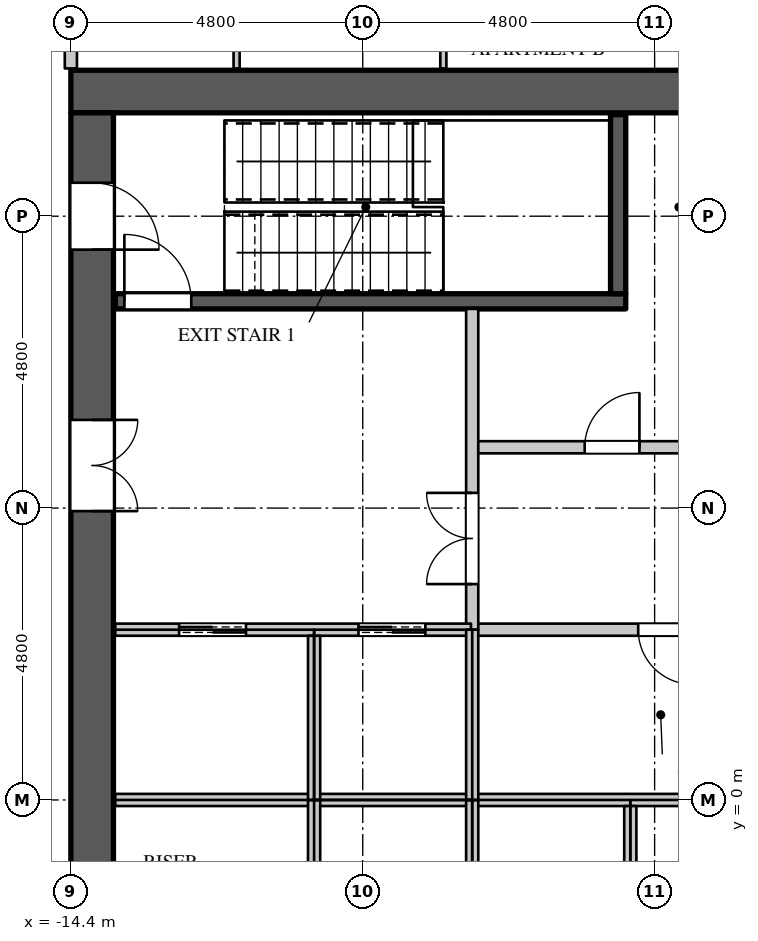
"""IFC4 building model, lengths in metres.
Left out: names, types, materials, properties, quantities, classifications, styles, units other than length and angle.
Written with IfcOpenShell. Run it as: python <this file> out.ifc"""

import sys

from ifc_helpers import new_model, si_unit, direction, frame, frame_2d, origin, place, context, subcontext, project, spatial, rectangle, extrude, element, fill, save


model = new_model("IFC4")
c1 = context("Model", 3, precision=1e-05, world=origin(), true_north=direction((0.0, 1.0)))
c2 = subcontext(c1, "Body", "Model", "MODEL_VIEW")
j1 = project(units=[si_unit("LENGTHUNIT", "METRE"), si_unit("PLANEANGLEUNIT", "RADIAN")], contexts=[c1])
p1 = place(None, origin())
s1 = spatial("IfcSite", under=j1, at=p1, CompositionType="ELEMENT")
p2 = place(p1, origin())
s2 = spatial("IfcBuilding", under=s1, at=p2, CompositionType="ELEMENT")
p3 = place(p2, frame((0.0, 0.0, 162.3)))
s3 = spatial("IfcBuildingStorey", under=s2, at=p3, CompositionType="ELEMENT", Elevation=162.3)
p4 = place(p3, frame((-14.4, 11.65, 0.0), z_axis=(0.0, 0.0, 1.0), x_axis=(1.0, 0.0, 0.0)))
e1 = element("IfcWall", 1, at=p4, inside=s3, PredefinedType="SHEAR", context=c2, shape_type="SweptSolid", body=[
    extrude(rectangle(XDim=28.8, YDim=0.7, at=frame_2d((14.4, 0.0))), origin(), (0.0, 0.0, 1.0), 4.2),
])
p5 = place(p3, frame((-14.05, -11.3, 0.0), z_axis=(0.0, 0.0, 1.0), x_axis=(0.0, 1.0, 0.0)))
e2 = element("IfcWall", 2, at=p5, inside=s3, PredefinedType="SHEAR", context=c2, shape_type="SweptSolid", body=[
    extrude(rectangle(XDim=22.6, YDim=0.7, at=frame_2d((11.3, 0.0))), origin(), (0.0, 0.0, 1.0), 4.2),
])
p6 = place(p5, frame((20.35, 0.0, 0.0)))
e3 = element("IfcOpeningElement", 3, at=p6, cuts=e2, PredefinedType="OPENING", context=c2, shape_type="SweptSolid", body=[
    extrude(rectangle(XDim=1.1, YDim=2.2, at=frame_2d((0.55, 1.1))), frame((0.0, 0.36, 0.0), z_axis=(0.0, -1.0, 0.0), x_axis=(1.0, 0.0, 0.0)), (0.0, 0.0, 1.0), 0.72),
])
p7 = place(p5, frame((1.15, 0.0, 0.0)))
e4 = element("IfcOpeningElement", 4, at=p7, cuts=e2, PredefinedType="OPENING", context=c2, shape_type="SweptSolid", body=[
    extrude(rectangle(XDim=1.1, YDim=2.2, at=frame_2d((0.55, 1.1))), frame((0.0, 0.36, 0.0), z_axis=(0.0, -1.0, 0.0), x_axis=(1.0, 0.0, 0.0)), (0.0, 0.0, 1.0), 0.72),
])
p8 = place(p5, frame((16.05, 0.0, 0.0)))
e5 = element("IfcOpeningElement", 5, at=p8, cuts=e2, PredefinedType="OPENING", context=c2, shape_type="SweptSolid", body=[
    extrude(rectangle(XDim=1.5, YDim=2.4, at=frame_2d((0.75, 1.2))), frame((0.0, 0.36, 0.0), z_axis=(0.0, -1.0, 0.0), x_axis=(1.0, 0.0, 0.0)), (0.0, 0.0, 1.0), 0.72),
])
p9 = place(p5, frame((5.05, 0.0, 0.0)))
e6 = element("IfcOpeningElement", 6, at=p9, cuts=e2, PredefinedType="OPENING", context=c2, shape_type="SweptSolid", body=[
    extrude(rectangle(XDim=1.5, YDim=2.4, at=frame_2d((0.75, 1.2))), frame((0.0, 0.36, 0.0), z_axis=(0.0, -1.0, 0.0), x_axis=(1.0, 0.0, 0.0)), (0.0, 0.0, 1.0), 0.72),
])
p10 = place(p3, frame((-14.4, 12.03, 0.0), z_axis=(0.0, 0.0, 1.0), x_axis=(0.0, 1.0, 0.0)))
e7 = element("IfcWall", 7, at=p10, inside=s3, PredefinedType="PARTITIONING", context=c2, shape_type="SweptSolid", body=[
    extrude(rectangle(XDim=2.27, YDim=0.2, at=frame_2d((1.135, 0.0))), origin(), (0.0, 0.0, 1.0), 3.95),
])
p11 = place(p3, frame((-7.82, 2.8, 0.0), z_axis=(0.0, 0.0, 1.0), x_axis=(1.0, 0.0, 0.0)))
e8 = element("IfcWall", 8, at=p11, inside=s3, PredefinedType="PARTITIONING", context=c2, shape_type="SweptSolid", body=[
    extrude(rectangle(XDim=18.24, YDim=0.2, at=frame_2d((9.12, 0.0))), origin(), (0.0, 0.0, 1.0), 3.95),
])
p12 = place(p11, frame((2.75, 0.0, 0.0)))
e9 = element("IfcOpeningElement", 9, at=p12, cuts=e8, PredefinedType="OPENING", context=c2, shape_type="SweptSolid", body=[
    extrude(rectangle(XDim=0.9, YDim=2.2, at=frame_2d((0.45, 1.1))), frame((0.0, 0.11, 0.0), z_axis=(0.0, -1.0, 0.0), x_axis=(1.0, 0.0, 0.0)), (0.0, 0.0, 1.0), 0.22),
])
p13 = place(p11, frame((9.55, 0.0, 0.0)))
e10 = element("IfcOpeningElement", 10, at=p13, cuts=e8, PredefinedType="OPENING", context=c2, shape_type="SweptSolid", body=[
    extrude(rectangle(XDim=0.9, YDim=2.2, at=frame_2d((0.45, 1.1))), frame((0.0, 0.11, 0.0), z_axis=(0.0, -1.0, 0.0), x_axis=(1.0, 0.0, 0.0)), (0.0, 0.0, 1.0), 0.22),
])
p14 = place(p11, frame((15.5, 0.0, 0.0)))
e11 = element("IfcOpeningElement", 11, at=p14, cuts=e8, PredefinedType="OPENING", context=c2, shape_type="SweptSolid", body=[
    extrude(rectangle(XDim=0.9, YDim=2.2, at=frame_2d((0.45, 1.1))), frame((0.0, 0.11, 0.0), z_axis=(0.0, -1.0, 0.0), x_axis=(1.0, 0.0, 0.0)), (0.0, 0.0, 1.0), 0.22),
])
p15 = place(p3, frame((-7.8, 2.8, 0.0), z_axis=(0.0, 0.0, 1.0), x_axis=(0.0, 1.0, 0.0)))
e12 = element("IfcWall", 12, at=p15, inside=s3, PredefinedType="PARTITIONING", context=c2, shape_type="SweptSolid", body=[
    extrude(rectangle(XDim=5.275, YDim=0.2, at=frame_2d((2.637, 0.0))), origin(), (0.0, 0.0, 1.0), 3.95),
])
p16 = place(p15, frame((0.75, 0.0, 0.0)))
e13 = element("IfcOpeningElement", 13, at=p16, cuts=e12, PredefinedType="OPENING", context=c2, shape_type="SweptSolid", body=[
    extrude(rectangle(XDim=1.5, YDim=2.4, at=frame_2d((0.75, 1.2))), frame((0.0, 0.11, 0.0), z_axis=(0.0, -1.0, 0.0), x_axis=(1.0, 0.0, 0.0)), (0.0, 0.0, 1.0), 0.22),
])
p17 = place(p3, frame((-7.7, 5.8, 0.0), z_axis=(0.0, 0.0, 1.0), x_axis=(1.0, 0.0, 0.0)))
e14 = element("IfcWall", 14, at=p17, inside=s3, PredefinedType="PARTITIONING", context=c2, shape_type="SweptSolid", body=[
    extrude(rectangle(XDim=16.52, YDim=0.2, at=frame_2d((8.26, 0.0))), origin(), (0.0, 0.0, 1.0), 3.95),
])
p18 = place(p17, frame((1.75, 0.0, 0.0)))
e15 = element("IfcOpeningElement", 15, at=p18, cuts=e14, PredefinedType="OPENING", context=c2, shape_type="SweptSolid", body=[
    extrude(rectangle(XDim=0.9, YDim=2.2, at=frame_2d((0.45, 1.1))), frame((0.0, 0.11, 0.0), z_axis=(0.0, -1.0, 0.0), x_axis=(1.0, 0.0, 0.0)), (0.0, 0.0, 1.0), 0.22),
])
p19 = place(p17, frame((6.5, 0.0, 0.0)))
e16 = element("IfcOpeningElement", 16, at=p19, cuts=e14, PredefinedType="OPENING", context=c2, shape_type="SweptSolid", body=[
    extrude(rectangle(XDim=0.9, YDim=2.2, at=frame_2d((0.45, 1.1))), frame((0.0, 0.11, 0.0), z_axis=(0.0, -1.0, 0.0), x_axis=(1.0, 0.0, 0.0)), (0.0, 0.0, 1.0), 0.22),
])
p20 = place(p17, frame((10.9, 0.0, 0.0)))
e17 = element("IfcOpeningElement", 17, at=p20, cuts=e14, PredefinedType="OPENING", context=c2, shape_type="SweptSolid", body=[
    extrude(rectangle(XDim=0.9, YDim=2.2, at=frame_2d((0.45, 1.1))), frame((0.0, 0.11, 0.0), z_axis=(0.0, -1.0, 0.0), x_axis=(1.0, 0.0, 0.0)), (0.0, 0.0, 1.0), 0.22),
])
p21 = place(p17, frame((14.3, 0.0, 0.0)))
e18 = element("IfcOpeningElement", 18, at=p21, cuts=e14, PredefinedType="OPENING", context=c2, shape_type="SweptSolid", body=[
    extrude(rectangle(XDim=0.9, YDim=2.2, at=frame_2d((0.45, 1.1))), frame((0.0, 0.11, 0.0), z_axis=(0.0, -1.0, 0.0), x_axis=(1.0, 0.0, 0.0)), (0.0, 0.0, 1.0), 0.22),
])
p22 = place(p3, frame((-13.67, 0.0, 0.0), z_axis=(0.0, 0.0, 1.0), x_axis=(1.0, 0.0, 0.0)))
e19 = element("IfcWall", 19, at=p22, inside=s3, PredefinedType="PARTITIONING", context=c2, shape_type="SweptSolid", body=[
    extrude(rectangle(XDim=21.47, YDim=0.2, at=frame_2d((10.735, 0.0))), origin(), (0.0, 0.0, 1.0), 3.95),
])
p23 = place(p3, frame((-13.67, 2.8, 0.0), z_axis=(0.0, 0.0, 1.0), x_axis=(1.0, 0.0, 0.0)))
e20 = element("IfcWall", 20, at=p23, inside=s3, PredefinedType="PARTITIONING", context=c2, shape_type="SweptSolid", body=[
    extrude(rectangle(XDim=5.85, YDim=0.2, at=frame_2d((2.925, 0.0))), origin(), (0.0, 0.0, 1.0), 3.95),
])
p24 = place(p23, frame((1.05, 0.0, 0.0)))
e21 = element("IfcOpeningElement", 21, at=p24, cuts=e20, PredefinedType="OPENING", context=c2, shape_type="SweptSolid", body=[
    extrude(rectangle(XDim=1.1, YDim=2.2, at=frame_2d((0.55, 1.1))), frame((0.0, 0.11, 0.0), z_axis=(0.0, -1.0, 0.0), x_axis=(1.0, 0.0, 0.0)), (0.0, 0.0, 1.0), 0.22),
])
p25 = place(p23, frame((4.0, 0.0, 0.0)))
e22 = element("IfcOpeningElement", 22, at=p25, cuts=e20, PredefinedType="OPENING", context=c2, shape_type="SweptSolid", body=[
    extrude(rectangle(XDim=1.1, YDim=2.2, at=frame_2d((0.55, 1.1))), frame((0.0, 0.11, 0.0), z_axis=(0.0, -1.0, 0.0), x_axis=(1.0, 0.0, 0.0)), (0.0, 0.0, 1.0), 0.22),
])
for number, where, z_axis, x_axis in (
    (23, (-10.4, -2.7, 0.0), (0.0, 0.0, 1.0), (0.0, 1.0, 0.0)),
    (24, (-10.4, 0.0, 0.0), (0.0, 0.0, 1.0), (0.0, 1.0, 0.0)),
):
    element("IfcWall", number, at=place(p3, frame(where, z_axis=z_axis, x_axis=x_axis)), inside=s3, PredefinedType="PARTITIONING", context=c2, shape_type="SweptSolid", body=[
        extrude(rectangle(XDim=2.7, YDim=0.2, at=frame_2d((1.35, 0.0))), origin(), (0.0, 0.0, 1.0), 3.95),
    ])
for number, where, z_axis, x_axis in (
    (25, (-7.8, -2.8, 0.0), (0.0, 0.0, 1.0), (0.0, 1.0, 0.0)),
    (26, (-7.8, 0.0, 0.0), (0.0, 0.0, 1.0), (0.0, 1.0, 0.0)),
):
    element("IfcWall", number, at=place(p3, frame(where, z_axis=z_axis, x_axis=x_axis)), inside=s3, PredefinedType="PARTITIONING", context=c2, shape_type="SweptSolid", body=[
        extrude(rectangle(XDim=2.8, YDim=0.2, at=frame_2d((1.4, 0.0))), origin(), (0.0, 0.0, 1.0), 3.95),
    ])
p26 = place(p3, frame((-5.2, -2.7, 0.0), z_axis=(0.0, 0.0, 1.0), x_axis=(0.0, 1.0, 0.0)))
e27 = element("IfcWall", 27, at=p26, inside=s3, PredefinedType="PARTITIONING", context=c2, shape_type="SweptSolid", body=[
    extrude(rectangle(XDim=2.6, YDim=0.2, at=frame_2d((1.3, 0.0))), origin(), (0.0, 0.0, 1.0), 3.95),
])
p27 = place(p3, frame((-13.67, 8.2, 0.0), z_axis=(0.0, 0.0, 1.0), x_axis=(1.0, 0.0, 0.0)))
e28 = element("IfcWall", 28, at=p27, inside=s3, PredefinedType="SHEAR", context=c2, shape_type="SweptSolid", body=[
    extrude(rectangle(XDim=8.395, YDim=0.25, at=frame_2d((4.198, 0.0))), origin(), (0.0, 0.0, 1.0), 3.95),
])
p28 = place(p27, frame((0.15, 0.0, 0.0)))
e29 = element("IfcOpeningElement", 29, at=p28, cuts=e28, PredefinedType="OPENING", context=c2, shape_type="SweptSolid", body=[
    extrude(rectangle(XDim=1.1, YDim=2.2, at=frame_2d((0.55, 1.1))), frame((0.0, 0.135, 0.0), z_axis=(0.0, -1.0, 0.0), x_axis=(1.0, 0.0, 0.0)), (0.0, 0.0, 1.0), 0.27),
])
p29 = place(p3, frame((-5.4, 8.325, 0.0), z_axis=(0.0, 0.0, 1.0), x_axis=(0.0, 1.0, 0.0)))
e30 = element("IfcWall", 30, at=p29, inside=s3, PredefinedType="SHEAR", context=c2, shape_type="SweptSolid", body=[
    extrude(rectangle(XDim=2.945, YDim=0.25, at=frame_2d((1.473, 0.0))), origin(), (0.0, 0.0, 1.0), 3.95),
])
p30 = place(p3, frame((-11.675, 12.03, 0.0), z_axis=(0.0, 0.0, 1.0), x_axis=(0.0, 1.0, 0.0)))
e31 = element("IfcWall", 31, at=p30, inside=s3, PredefinedType="PARTITIONING", context=c2, shape_type="SweptSolid", body=[
    extrude(rectangle(XDim=2.895, YDim=0.1, at=frame_2d((1.448, 0.0))), origin(), (0.0, 0.0, 1.0), 3.95),
])
p31 = place(p30, frame((0.95, 0.0, 0.0)))
e32 = element("IfcOpeningElement", 32, at=p31, cuts=e31, PredefinedType="OPENING", context=c2, shape_type="SweptSolid", body=[
    extrude(rectangle(XDim=0.9, YDim=2.2, at=frame_2d((0.45, 1.1))), frame((0.0, 0.06, 0.0), z_axis=(0.0, -1.0, 0.0), x_axis=(1.0, 0.0, 0.0)), (0.0, 0.0, 1.0), 0.12),
])
p32 = place(p3, frame((-8.274, 12.03, 0.0), z_axis=(0.0, 0.0, 1.0), x_axis=(0.0, 1.0, 0.0)))
e33 = element("IfcWall", 33, at=p32, inside=s3, PredefinedType="PARTITIONING", context=c2, shape_type="SweptSolid", body=[
    extrude(rectangle(XDim=2.95, YDim=0.1, at=frame_2d((1.475, 0.0))), origin(), (0.0, 0.0, 1.0), 3.95),
])
p33 = place(p18, origin())
e34 = element("IfcDoor", 34, at=p33, inside=s3, OperationType="SINGLE_SWING_RIGHT", PredefinedType="DOOR", context=c2, shape_type="SweptSolid", body=[
    extrude(rectangle(XDim=0.9, YDim=2.2, at=frame_2d((0.45, 1.1))), frame((0.0, 0.025, 0.0), z_axis=(0.0, -1.0, 0.0), x_axis=(1.0, 0.0, 0.0)), (0.0, 0.0, 1.0), 0.05),
])
fill(e15, e34)
p34 = place(p12, origin())
e35 = element("IfcDoor", 35, at=p34, inside=s3, OperationType="SINGLE_SWING_LEFT", PredefinedType="DOOR", context=c2, shape_type="SweptSolid", body=[
    extrude(rectangle(XDim=0.9, YDim=2.2, at=frame_2d((0.45, 1.1))), frame((0.0, 0.025, 0.0), z_axis=(0.0, -1.0, 0.0), x_axis=(1.0, 0.0, 0.0)), (0.0, 0.0, 1.0), 0.05),
])
fill(e9, e35)
p35 = place(p24, origin())
e36 = element("IfcDoor", 36, at=p35, inside=s3, OperationType="DOUBLE_DOOR_SLIDING", PredefinedType="DOOR", context=c2, shape_type="SweptSolid", body=[
    extrude(rectangle(XDim=1.1, YDim=2.2, at=frame_2d((0.55, 1.1))), frame((0.0, 0.025, 0.0), z_axis=(0.0, -1.0, 0.0), x_axis=(1.0, 0.0, 0.0)), (0.0, 0.0, 1.0), 0.05),
])
fill(e21, e36)
p36 = place(p25, origin())
e37 = element("IfcDoor", 37, at=p36, inside=s3, OperationType="DOUBLE_DOOR_SLIDING", PredefinedType="DOOR", context=c2, shape_type="SweptSolid", body=[
    extrude(rectangle(XDim=1.1, YDim=2.2, at=frame_2d((0.55, 1.1))), frame((0.0, 0.025, 0.0), z_axis=(0.0, -1.0, 0.0), x_axis=(1.0, 0.0, 0.0)), (0.0, 0.0, 1.0), 0.05),
])
fill(e22, e37)
p37 = place(p28, origin())
e38 = element("IfcDoor", 38, at=p37, inside=s3, OperationType="SINGLE_SWING_LEFT", PredefinedType="DOOR", context=c2, shape_type="SweptSolid", body=[
    extrude(rectangle(XDim=1.1, YDim=2.2, at=frame_2d((0.55, 1.1))), frame((0.0, 0.025, 0.0), z_axis=(0.0, -1.0, 0.0), x_axis=(1.0, 0.0, 0.0)), (0.0, 0.0, 1.0), 0.05),
])
fill(e29, e38)
p38 = place(p16, origin())
e39 = element("IfcDoor", 39, at=p38, inside=s3, OperationType="DOUBLE_DOOR_SINGLE_SWING", PredefinedType="DOOR", context=c2, shape_type="SweptSolid", body=[
    extrude(rectangle(XDim=1.5, YDim=2.4, at=frame_2d((0.75, 1.2))), frame((0.0, 0.025, 0.0), z_axis=(0.0, -1.0, 0.0), x_axis=(1.0, 0.0, 0.0)), (0.0, 0.0, 1.0), 0.05),
])
fill(e13, e39)
p39 = place(p6, origin())
e40 = element("IfcDoor", 40, at=p39, inside=s3, OperationType="SINGLE_SWING_RIGHT", PredefinedType="DOOR", context=c2, shape_type="SweptSolid", body=[
    extrude(rectangle(XDim=1.1, YDim=2.2, at=frame_2d((0.55, 1.1))), frame((0.0, -0.295, 0.0), z_axis=(0.0, -1.0, 0.0), x_axis=(1.0, 0.0, 0.0)), (0.0, 0.0, 1.0), 0.05),
])
fill(e3, e40)
p40 = place(p8, origin())
e41 = element("IfcDoor", 41, at=p40, inside=s3, OperationType="DOUBLE_DOOR_SINGLE_SWING", PredefinedType="DOOR", context=c2, shape_type="SweptSolid", body=[
    extrude(rectangle(XDim=1.5, YDim=2.4, at=frame_2d((0.75, 1.2))), frame((0.0, -0.295, 0.0), z_axis=(0.0, -1.0, 0.0), x_axis=(1.0, 0.0, 0.0)), (0.0, 0.0, 1.0), 0.05),
])
fill(e5, e41)
save(model, sys.argv[1])
